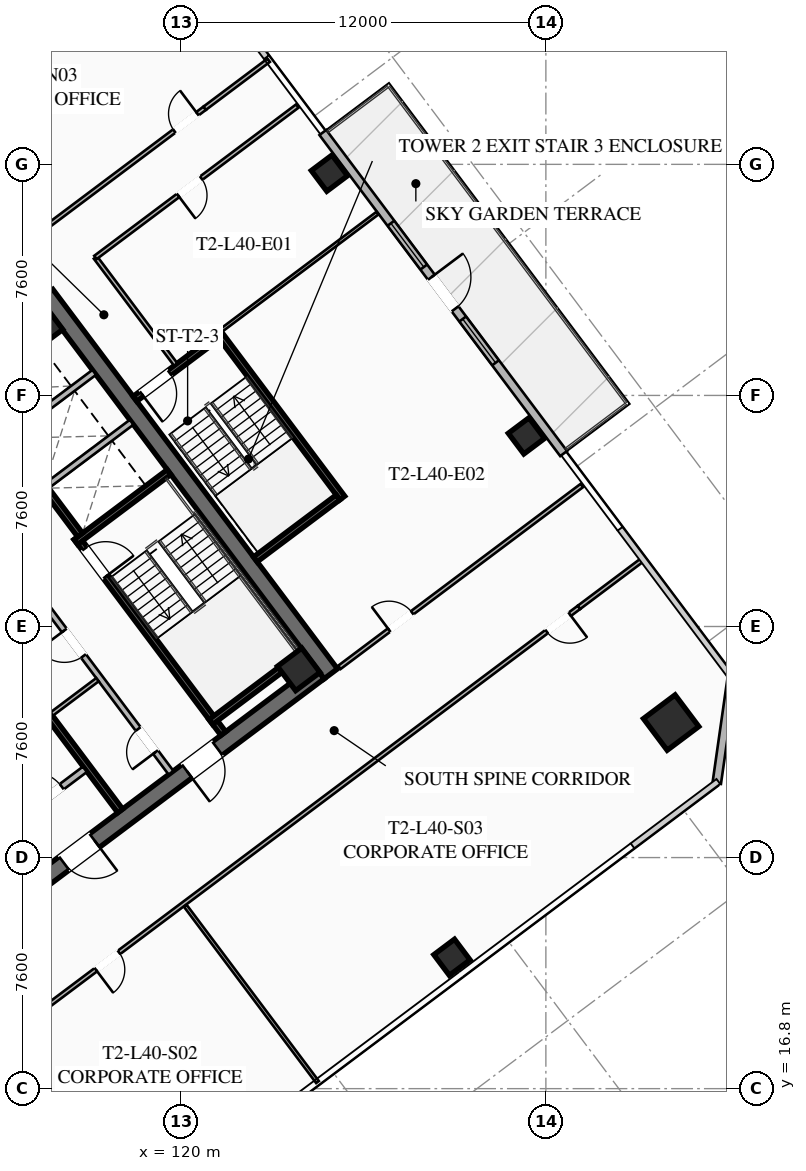
"""IFC4 building model, lengths in metres.
Left out: names, types, materials, properties, quantities, classifications, styles, units other than length and angle.
Written with IfcOpenShell. Run it as: python <this file> out.ifc"""

import sys

from ifc_helpers import new_model, si_unit, direction, frame, frame_2d, origin, origin_2d, place, context, subcontext, project, spatial, rectangle, hollow_rectangle, extrude, element, fill, save


model = new_model("IFC4")
c1 = context("Model", 3, precision=1e-05, world=origin(), true_north=direction((0.0, 1.0)))
c2 = subcontext(c1, "Body", "Model", "MODEL_VIEW")
j1 = project(units=[si_unit("LENGTHUNIT", "METRE"), si_unit("PLANEANGLEUNIT", "RADIAN")], contexts=[c1])
p1 = place(None, origin())
s1 = spatial("IfcSite", under=j1, at=p1, CompositionType="ELEMENT")
p2 = place(p1, origin())
s2 = spatial("IfcBuilding", under=s1, at=p2, CompositionType="ELEMENT")
p3 = place(p2, frame((0.0, 0.0, 149.9)))
s3 = spatial("IfcBuildingStorey", under=s2, at=p3, CompositionType="ELEMENT", Elevation=149.9)
p4 = place(p3, frame((115.564, 42.923, 0.0), z_axis=(0.0, 0.0, 1.0), x_axis=(0.600005007985, -0.799996243986, 0.0)))
e1 = element("IfcWall", 1, at=p4, inside=s3, PredefinedType="SHEAR", context=c2, shape_type="SweptSolid", body=[
    extrude(rectangle(XDim=15.6, YDim=0.55, at=frame_2d((7.8, 0.0))), origin(), (0.0, 0.0, 1.0), 3.55),
])
p5 = place(p3, frame((124.539, 30.498, 0.0), z_axis=(0.0, 0.0, 1.0), x_axis=(-0.799998054672, -0.600002593761, 0.0)))
e2 = element("IfcWall", 2, at=p5, inside=s3, PredefinedType="SHEAR", context=c2, shape_type="SweptSolid", body=[
    extrude(rectangle(XDim=15.06, YDim=0.55, at=frame_2d((7.53, 0.0))), origin(), (0.0, 0.0, 1.0), 3.55),
])
p6 = place(p5, frame((9.23, 0.0, 0.0)))
e3 = element("IfcOpeningElement", 3, at=p6, cuts=e2, PredefinedType="OPENING", context=c2, shape_type="SweptSolid", body=[
    extrude(rectangle(XDim=1.25, YDim=2.25, at=frame_2d((0.625, 1.125))), frame((0.0, 0.285, 0.0), z_axis=(0.0, -1.0, 0.0), x_axis=(1.0, 0.0, 0.0)), (0.0, 0.0, 1.0), 0.57),
])
p7 = place(p5, frame((4.18, 0.0, 0.0)))
e4 = element("IfcOpeningElement", 4, at=p7, cuts=e2, PredefinedType="OPENING", context=c2, shape_type="SweptSolid", body=[
    extrude(rectangle(XDim=1.25, YDim=2.25, at=frame_2d((0.625, 1.125))), frame((0.0, 0.285, 0.0), z_axis=(0.0, -1.0, 0.0), x_axis=(1.0, 0.0, 0.0)), (0.0, 0.0, 1.0), 0.57),
])
for number, where, z_axis, x_axis in (
    (5, (123.87, 30.59, 0.0), (0.0, 0.0, 1.0), (0.8, 0.6, 0.0)),
    (6, (115.41, 41.87, 0.0), (0.0, 0.0, 1.0), (0.8, 0.6, 0.0)),
):
    element("IfcColumn", number, at=place(p3, frame(where, z_axis=z_axis, x_axis=x_axis)), inside=s3, PredefinedType="COLUMN", context=c2, shape_type="SweptSolid", body=[
        extrude(hollow_rectangle(XDim=1.0, YDim=1.0, WallThickness=0.04, at=origin_2d()), origin(), (0.0, 0.0, 1.0), 3.37),
    ])
p8 = place(p3, frame((136.12, 28.84, 0.0), z_axis=(0.0, 0.0, 1.0), x_axis=(0.799999996291, 0.600000004945, 0.0)))
e7 = element("IfcColumn", 7, at=p8, inside=s3, PredefinedType="COLUMN", context=c2, shape_type="SweptSolid", body=[
    extrude(hollow_rectangle(XDim=1.3, YDim=1.3, WallThickness=0.05, at=origin_2d()), origin(), (0.0, 0.0, 1.0), 3.37),
])
for number, where, z_axis, x_axis in (
    (8, (128.91, 21.12, 0.0), (0.0, 0.0, 1.0), (0.8, 0.6, 0.0)),
    (9, (131.36, 38.27, 0.0), (0.0, 0.0, 1.0), (0.8, 0.6, 0.0)),
    (10, (124.88, 46.91, 0.0), (0.0, 0.0, 1.0), (0.8, 0.6, 0.0)),
):
    element("IfcColumn", number, at=place(p3, frame(where, z_axis=z_axis, x_axis=x_axis)), inside=s3, PredefinedType="COLUMN", context=c2, shape_type="SweptSolid", body=[
        extrude(hollow_rectangle(XDim=0.85, YDim=0.85, WallThickness=0.035, at=origin_2d()), origin(), (0.0, 0.0, 1.0), 3.37),
    ])
p9 = place(p3, frame((124.664, 48.248, 0.0), z_axis=(0.0, 0.0, 1.0), x_axis=(0.599994081423, -0.800004438899, 0.0)))
e11 = element("IfcWall", 11, at=p9, inside=s3, PredefinedType="SOLIDWALL", context=c2, shape_type="SweptSolid", body=[
    extrude(rectangle(XDim=13.2, YDim=0.28, at=frame_2d((6.6, 0.0))), origin(), (0.0, 0.0, 1.0), 3.37),
])
p10 = place(p9, frame((5.95, 0.0, 0.0)))
e12 = element("IfcOpeningElement", 12, at=p10, cuts=e11, PredefinedType="OPENING", context=c2, shape_type="SweptSolid", body=[
    extrude(rectangle(XDim=1.3, YDim=2.15, at=frame_2d((0.65, 1.075))), frame((0.0, 0.15, 0.0), z_axis=(0.0, -1.0, 0.0), x_axis=(1.0, 0.0, 0.0)), (0.0, 0.0, 1.0), 0.3),
])
p11 = place(p9, frame((3.732, 0.0, 0.85)))
e13 = element("IfcOpeningElement", 13, at=p11, cuts=e11, PredefinedType="OPENING", context=c2, shape_type="SweptSolid", body=[
    extrude(rectangle(XDim=1.8, YDim=1.92, at=frame_2d((0.9, 0.96))), frame((0.0, 0.15, 0.0), z_axis=(0.0, -1.0, 0.0), x_axis=(1.0, 0.0, 0.0)), (0.0, 0.0, 1.0), 0.3),
])
p12 = place(p9, frame((7.668, 0.0, 0.85)))
e14 = element("IfcOpeningElement", 14, at=p12, cuts=e11, PredefinedType="OPENING", context=c2, shape_type="SweptSolid", body=[
    extrude(rectangle(XDim=1.8, YDim=1.92, at=frame_2d((0.9, 0.96))), frame((0.0, 0.15, 0.0), z_axis=(0.0, -1.0, 0.0), x_axis=(1.0, 0.0, 0.0)), (0.0, 0.0, 1.0), 0.3),
])
p13 = place(p3, frame((138.12, 30.34, 0.0), z_axis=(0.0, 0.0, 1.0), x_axis=(-0.141421356237, -0.989949493661, 0.0)))
e15 = element("IfcWall", 15, at=p13, inside=s3, PredefinedType="SOLIDWALL", context=c2, shape_type="SweptSolid", body=[
    extrude(rectangle(XDim=3.536, YDim=0.28, at=frame_2d((1.768, 0.0))), origin(), (0.0, 0.0, 1.0), 3.37),
])
p14 = place(p3, frame((116.56, 34.92, 0.0), z_axis=(0.0, 0.0, 1.0), x_axis=(0.59999029481, -0.8000072788, 0.0)))
e16 = element("IfcWall", 16, at=p14, inside=s3, PredefinedType="SHEAR", context=c2, shape_type="SweptSolid", body=[
    extrude(rectangle(XDim=8.05, YDim=0.2, at=frame_2d((4.025, 0.0))), origin(), (0.0, 0.0, 1.0), 3.37),
])
p15 = place(p14, frame((0.45, 0.0, 0.0)))
e17 = element("IfcOpeningElement", 17, at=p15, cuts=e16, PredefinedType="OPENING", context=c2, shape_type="SweptSolid", body=[
    extrude(rectangle(XDim=1.15, YDim=2.2, at=frame_2d((0.575, 1.1))), frame((0.0, 0.11, 0.0), z_axis=(0.0, -1.0, 0.0), x_axis=(1.0, 0.0, 0.0)), (0.0, 0.0, 1.0), 0.22),
])
for number, where, z_axis, x_axis in (
    (18, (116.54, 34.78, 0.0), (0.0, 0.0, 1.0), (0.8, 0.6, 0.0)),
    (19, (120.98, 28.86, 0.0), (0.0, 0.0, 1.0), (0.8, 0.6, 0.0)),
):
    element("IfcWall", number, at=place(p3, frame(where, z_axis=z_axis, x_axis=x_axis)), inside=s3, PredefinedType="SHEAR", context=c2, shape_type="SweptSolid", body=[
        extrude(rectangle(XDim=3.83, YDim=0.2, at=frame_2d((1.915, 0.0))), origin(), (0.0, 0.0, 1.0), 3.37),
    ])
p16 = place(p3, frame((117.998, 25.936, 0.0), z_axis=(0.0, 0.0, 1.0), x_axis=(-0.600002693989, 0.799997979501, 0.0)))
e20 = element("IfcWall", 20, at=p16, inside=s3, PredefinedType="SHEAR", context=c2, shape_type="SweptSolid", body=[
    extrude(rectangle(XDim=14.5, YDim=0.2, at=frame_2d((7.25, 0.0))), origin(), (0.0, 0.0, 1.0), 3.37),
])
p17 = place(p3, frame((114.316, 25.412, 0.0), z_axis=(0.0, 0.0, 1.0), x_axis=(0.800018601094, 0.59997519774, 0.0)))
e21 = element("IfcWall", 21, at=p17, inside=s3, PredefinedType="SOLIDWALL", context=c2, shape_type="SweptSolid", body=[
    extrude(rectangle(XDim=3.15, YDim=0.22, at=frame_2d((1.575, 0.0))), origin(), (0.0, 0.0, 1.0), 2.723),
])
p18 = place(p17, frame((0.95, 0.0, 0.0)))
e22 = element("IfcOpeningElement", 22, at=p18, cuts=e21, PredefinedType="OPENING", context=c2, shape_type="SweptSolid", body=[
    extrude(rectangle(XDim=1.25, YDim=2.25, at=frame_2d((0.625, 1.125))), frame((0.0, 0.12, 0.0), z_axis=(0.0, -1.0, 0.0), x_axis=(1.0, 0.0, 0.0)), (0.0, 0.0, 1.0), 0.24),
])
p19 = place(p3, frame((112.81, 40.17, 0.0), z_axis=(0.0, 0.0, 1.0), x_axis=(0.599993943644, -0.800004542231, 0.0)))
e23 = element("IfcWall", 23, at=p19, inside=s3, PredefinedType="SHEAR", context=c2, shape_type="SweptSolid", body=[
    extrude(rectangle(XDim=6.45, YDim=0.2, at=frame_2d((3.225, 0.0))), origin(), (0.0, 0.0, 1.0), 3.37),
])
for number, where, z_axis, x_axis in (
    (24, (115.59, 36.63, 0.0), (0.0, 0.0, 1.0), (0.8, 0.6, 0.0)),
    (25, (114.36, 38.27, 0.0), (0.0, 0.0, 1.0), (0.8, 0.6, 0.0)),
):
    element("IfcWall", number, at=place(p3, frame(where, z_axis=z_axis, x_axis=x_axis)), inside=s3, PredefinedType="SOLIDWALL", context=c2, shape_type="SweptSolid", body=[
        extrude(rectangle(XDim=3.48, YDim=0.2, at=frame_2d((1.74, 0.0))), origin(), (0.0, 0.0, 1.0), 3.37),
    ])
p20 = place(p3, frame((119.67, 27.19, 0.0), z_axis=(0.0, 0.0, 1.0), x_axis=(-0.599988677396, 0.800008491828, 0.0)))
e26 = element("IfcWall", 26, at=p20, inside=s3, PredefinedType="SOLIDWALL", context=c2, shape_type="SweptSolid", body=[
    extrude(rectangle(XDim=6.9, YDim=0.2, at=frame_2d((3.45, 0.0))), origin(), (0.0, 0.0, 1.0), 2.723),
])
p21 = place(p20, frame((0.85, 0.0, 0.0)))
e27 = element("IfcOpeningElement", 27, at=p21, cuts=e26, PredefinedType="OPENING", context=c2, shape_type="SweptSolid", body=[
    extrude(rectangle(XDim=0.95, YDim=2.05, at=frame_2d((0.475, 1.025))), frame((0.0, 0.11, 0.0), z_axis=(0.0, -1.0, 0.0), x_axis=(1.0, 0.0, 0.0)), (0.0, 0.0, 1.0), 0.22),
])
p22 = place(p20, frame((4.8, 0.0, 0.0)))
e28 = element("IfcOpeningElement", 28, at=p22, cuts=e26, PredefinedType="OPENING", context=c2, shape_type="SweptSolid", body=[
    extrude(rectangle(XDim=1.05, YDim=2.2, at=frame_2d((0.525, 1.1))), frame((0.0, 0.11, 0.0), z_axis=(0.0, -1.0, 0.0), x_axis=(1.0, 0.0, 0.0)), (0.0, 0.0, 1.0), 0.22),
])
p23 = place(p3, frame((115.746, 29.122, 0.0), z_axis=(0.0, 0.0, 1.0), x_axis=(0.8, 0.6, 0.0)))
e29 = element("IfcWall", 29, at=p23, inside=s3, PredefinedType="PARTITIONING", context=c2, shape_type="SweptSolid", body=[
    extrude(rectangle(XDim=1.88, YDim=0.135, at=frame_2d((0.94, 0.0))), origin(), (0.0, 0.0, 1.0), 2.723),
])
p24 = place(p3, frame((125.304, 36.228, 0.0), z_axis=(0.0, 0.0, 1.0), x_axis=(-0.59998851072, 0.800008616831, 0.0)))
e30 = element("IfcWall", 30, at=p24, inside=s3, PredefinedType="SHEAR", context=c2, shape_type="SweptSolid", body=[
    extrude(rectangle(XDim=6.8, YDim=0.2, at=frame_2d((3.4, 0.0))), origin(), (0.0, 0.0, 1.0), 3.37),
])
p25 = place(p3, frame((121.204, 41.528, 0.0), z_axis=(0.0, 0.0, 1.0), x_axis=(-0.800017232136, -0.599977023131, 0.0)))
e31 = element("IfcWall", 31, at=p25, inside=s3, PredefinedType="SHEAR", context=c2, shape_type="SweptSolid", body=[
    extrude(rectangle(XDim=3.4, YDim=0.2, at=frame_2d((1.7, 0.0))), origin(), (0.0, 0.0, 1.0), 3.37),
])
p26 = place(p25, frame((1.975, 0.0, 0.0)))
e32 = element("IfcOpeningElement", 32, at=p26, cuts=e31, PredefinedType="OPENING", context=c2, shape_type="SweptSolid", body=[
    extrude(rectangle(XDim=1.15, YDim=2.2, at=frame_2d((0.575, 1.1))), frame((0.0, 0.11, 0.0), z_axis=(0.0, -1.0, 0.0), x_axis=(1.0, 0.0, 0.0)), (0.0, 0.0, 1.0), 0.22),
])
p27 = place(p3, frame((122.444, 34.208, 0.0), z_axis=(0.0, 0.0, 1.0), x_axis=(0.79999138319, 0.600011488909, 0.0)))
e33 = element("IfcWall", 33, at=p27, inside=s3, PredefinedType="SHEAR", context=c2, shape_type="SweptSolid", body=[
    extrude(rectangle(XDim=3.4, YDim=0.2, at=frame_2d((1.7, 0.0))), origin(), (0.0, 0.0, 1.0), 3.37),
])
p28 = place(p3, frame((119.824, 40.618, 0.0), z_axis=(0.0, 0.0, 1.0), x_axis=(-0.599982243973, 0.800013316712, 0.0)))
e34 = element("IfcWall", 34, at=p28, inside=s3, PredefinedType="PARTITIONING", context=c2, shape_type="SweptSolid", body=[
    extrude(rectangle(XDim=4.4, YDim=0.135, at=frame_2d((2.2, 0.0))), origin(), (0.0, 0.0, 1.0), 2.723),
])
p29 = place(p3, frame((95.738, 30.266, 0.0), z_axis=(0.0, 0.0, 1.0), x_axis=(0.800003744006, 0.59999500796, 0.0)))
e35 = element("IfcWall", 35, at=p29, inside=s3, PredefinedType="PARTITIONING", context=c2, shape_type="SweptSolid", body=[
    extrude(rectangle(XDim=31.3, YDim=0.135, at=frame_2d((15.65, 0.0))), origin(), (0.0, 0.0, 1.0), 2.723),
])
p30 = place(p29, frame((0.3, 0.0, 0.0)))
e36 = element("IfcOpeningElement", 36, at=p30, cuts=e35, PredefinedType="OPENING", context=c2, shape_type="SweptSolid", body=[
    extrude(rectangle(XDim=0.95, YDim=2.05, at=frame_2d((0.475, 1.025))), frame((0.0, 0.077, 0.0), z_axis=(0.0, -1.0, 0.0), x_axis=(1.0, 0.0, 0.0)), (0.0, 0.0, 1.0), 0.155),
])
p31 = place(p29, frame((15.493, 0.0, 0.0)))
e37 = element("IfcOpeningElement", 37, at=p31, cuts=e35, PredefinedType="OPENING", context=c2, shape_type="SweptSolid", body=[
    extrude(rectangle(XDim=0.95, YDim=2.05, at=frame_2d((0.475, 1.025))), frame((0.0, 0.077, 0.0), z_axis=(0.0, -1.0, 0.0), x_axis=(1.0, 0.0, 0.0)), (0.0, 0.0, 1.0), 0.155),
])
p32 = place(p29, frame((30.05, 0.0, 0.0)))
e38 = element("IfcOpeningElement", 38, at=p32, cuts=e35, PredefinedType="OPENING", context=c2, shape_type="SweptSolid", body=[
    extrude(rectangle(XDim=0.95, YDim=2.05, at=frame_2d((0.475, 1.025))), frame((0.0, 0.077, 0.0), z_axis=(0.0, -1.0, 0.0), x_axis=(1.0, 0.0, 0.0)), (0.0, 0.0, 1.0), 0.155),
])
p33 = place(p3, frame((120.778, 49.046, 0.0), z_axis=(0.0, 0.0, 1.0), x_axis=(0.799977721118, 0.600029704027, 0.0)))
e39 = element("IfcWall", 39, at=p33, inside=s3, PredefinedType="PARTITIONING", context=c2, shape_type="SweptSolid", body=[
    extrude(rectangle(XDim=2.63, YDim=0.135, at=frame_2d((1.315, 0.0))), origin(), (0.0, 0.0, 1.0), 2.723),
])
p34 = place(p3, frame((133.09, 32.63, 0.0), z_axis=(0.0, 0.0, 1.0), x_axis=(-0.800003744006, -0.59999500796, 0.0)))
e40 = element("IfcWall", 40, at=p34, inside=s3, PredefinedType="PARTITIONING", context=c2, shape_type="SweptSolid", body=[
    extrude(rectangle(XDim=31.3, YDim=0.135, at=frame_2d((15.65, 0.0))), origin(), (0.0, 0.0, 1.0), 2.723),
])
p35 = place(p34, frame((29.97, 0.0, 0.0)))
e41 = element("IfcOpeningElement", 41, at=p35, cuts=e40, PredefinedType="OPENING", context=c2, shape_type="SweptSolid", body=[
    extrude(rectangle(XDim=0.95, YDim=2.05, at=frame_2d((0.475, 1.025))), frame((0.0, 0.077, 0.0), z_axis=(0.0, -1.0, 0.0), x_axis=(1.0, 0.0, 0.0)), (0.0, 0.0, 1.0), 0.155),
])
p36 = place(p34, frame((18.914, 0.0, 0.0)))
e42 = element("IfcOpeningElement", 42, at=p36, cuts=e40, PredefinedType="OPENING", context=c2, shape_type="SweptSolid", body=[
    extrude(rectangle(XDim=0.95, YDim=2.05, at=frame_2d((0.475, 1.025))), frame((0.0, 0.077, 0.0), z_axis=(0.0, -1.0, 0.0), x_axis=(1.0, 0.0, 0.0)), (0.0, 0.0, 1.0), 0.155),
])
p37 = place(p34, frame((0.38, 0.0, 0.0)))
e43 = element("IfcOpeningElement", 43, at=p37, cuts=e40, PredefinedType="OPENING", context=c2, shape_type="SweptSolid", body=[
    extrude(rectangle(XDim=0.95, YDim=2.05, at=frame_2d((0.475, 1.025))), frame((0.0, 0.077, 0.0), z_axis=(0.0, -1.0, 0.0), x_axis=(1.0, 0.0, 0.0)), (0.0, 0.0, 1.0), 0.155),
])
p38 = place(p3, frame((133.09, 32.63, 0.0), z_axis=(0.0, 0.0, 1.0), x_axis=(0.799977721118, 0.600029704027, 0.0)))
e44 = element("IfcWall", 44, at=p38, inside=s3, PredefinedType="PARTITIONING", context=c2, shape_type="SweptSolid", body=[
    extrude(rectangle(XDim=2.63, YDim=0.135, at=frame_2d((1.315, 0.0))), origin(), (0.0, 0.0, 1.0), 2.723),
])
for number, where, z_axis, x_axis in (
    (45, (118.248, 12.336, 0.0), (0.0, 0.0, 1.0), (-0.6, 0.8, 0.0)),
    (46, (124.488, 17.016, 0.0), (0.0, 0.0, 1.0), (-0.6, 0.8, 0.0)),
):
    element("IfcWall", number, at=place(p3, frame(where, z_axis=z_axis, x_axis=x_axis)), inside=s3, PredefinedType="PARTITIONING", context=c2, shape_type="SweptSolid", body=[
        extrude(rectangle(XDim=7.25, YDim=0.11, at=frame_2d((3.625, 0.0))), origin(), (0.0, 0.0, 1.0), 2.723),
    ])
p39 = place(p3, frame((123.824, 49.118, 0.0), z_axis=(0.0, 0.0, 1.0), x_axis=(-0.799996470201, -0.60000470637, 0.0)))
e47 = element("IfcWall", 47, at=p39, inside=s3, PredefinedType="PARTITIONING", context=c2, shape_type="SweptSolid", body=[
    extrude(rectangle(XDim=8.3, YDim=0.135, at=frame_2d((4.15, 0.0))), origin(), (0.0, 0.0, 1.0), 2.723),
])
p40 = place(p39, frame((3.95, 0.0, 0.0)))
e48 = element("IfcOpeningElement", 48, at=p40, cuts=e47, PredefinedType="OPENING", context=c2, shape_type="SweptSolid", body=[
    extrude(rectangle(XDim=0.95, YDim=2.05, at=frame_2d((0.475, 1.025))), frame((0.0, 0.077, 0.0), z_axis=(0.0, -1.0, 0.0), x_axis=(1.0, 0.0, 0.0)), (0.0, 0.0, 1.0), 0.155),
])
p41 = place(p3, frame((125.208, 30.656, 0.0), z_axis=(0.0, 0.0, 1.0), x_axis=(0.800005876956, 0.599992163979, 0.0)))
e49 = element("IfcWall", 49, at=p41, inside=s3, PredefinedType="PARTITIONING", context=c2, shape_type="SweptSolid", body=[
    extrude(rectangle(XDim=9.97, YDim=0.135, at=frame_2d((4.985, 0.0))), origin(), (0.0, 0.0, 1.0), 2.723),
])
p42 = place(p41, frame((2.045, 0.0, 0.0)))
e50 = element("IfcOpeningElement", 50, at=p42, cuts=e49, PredefinedType="OPENING", context=c2, shape_type="SweptSolid", body=[
    extrude(rectangle(XDim=0.95, YDim=2.05, at=frame_2d((0.475, 1.025))), frame((0.0, 0.077, 0.0), z_axis=(0.0, -1.0, 0.0), x_axis=(1.0, 0.0, 0.0)), (0.0, 0.0, 1.0), 0.155),
])
p43 = place(p3, frame((126.464, 45.598, 0.0), z_axis=(0.0, 0.0, 1.0), x_axis=(-0.8000181681, -0.599975775102, 0.0)))
e51 = element("IfcWall", 51, at=p43, inside=s3, PredefinedType="PARTITIONING", context=c2, shape_type="SweptSolid", body=[
    extrude(rectangle(XDim=6.45, YDim=0.11, at=frame_2d((3.225, 0.0))), origin(), (0.0, 0.0, 1.0), 2.723),
])
p44 = place(p10, origin())
e52 = element("IfcDoor", 52, at=p44, inside=s3, OperationType="SINGLE_SWING_LEFT", PredefinedType="DOOR", context=c2, shape_type="SweptSolid", body=[
    extrude(rectangle(XDim=1.3, YDim=2.15, at=frame_2d((0.65, 1.075))), frame((0.0, 0.025, 0.0), z_axis=(0.0, -1.0, 0.0), x_axis=(1.0, 0.0, 0.0)), (0.0, 0.0, 1.0), 0.05),
])
fill(e12, e52)
p45 = place(p11, origin())
e53 = element("IfcWindow", 53, at=p45, inside=s3, PartitioningType="SINGLE_PANEL", PredefinedType="WINDOW", context=c2, shape_type="SweptSolid", body=[
    extrude(rectangle(XDim=1.8, YDim=1.92, at=frame_2d((0.9, 0.96))), frame((0.0, 0.03, 0.0), z_axis=(0.0, -1.0, 0.0), x_axis=(1.0, 0.0, 0.0)), (0.0, 0.0, 1.0), 0.06),
])
fill(e13, e53)
p46 = place(p12, origin())
e54 = element("IfcWindow", 54, at=p46, inside=s3, PartitioningType="SINGLE_PANEL", PredefinedType="WINDOW", context=c2, shape_type="SweptSolid", body=[
    extrude(rectangle(XDim=1.8, YDim=1.92, at=frame_2d((0.9, 0.96))), frame((0.0, 0.03, 0.0), z_axis=(0.0, -1.0, 0.0), x_axis=(1.0, 0.0, 0.0)), (0.0, 0.0, 1.0), 0.06),
])
fill(e14, e54)
p47 = place(p6, origin())
e55 = element("IfcDoor", 55, at=p47, inside=s3, OperationType="SINGLE_SWING_LEFT", PredefinedType="DOOR", context=c2, shape_type="SweptSolid", body=[
    extrude(rectangle(XDim=1.25, YDim=2.25, at=frame_2d((0.625, 1.125))), frame((0.0, 0.025, 0.0), z_axis=(0.0, -1.0, 0.0), x_axis=(1.0, 0.0, 0.0)), (0.0, 0.0, 1.0), 0.05),
])
fill(e3, e55)
p48 = place(p7, origin())
e56 = element("IfcDoor", 56, at=p48, inside=s3, OperationType="SINGLE_SWING_RIGHT", PredefinedType="DOOR", context=c2, shape_type="SweptSolid", body=[
    extrude(rectangle(XDim=1.25, YDim=2.25, at=frame_2d((0.625, 1.125))), frame((0.0, 0.025, 0.0), z_axis=(0.0, -1.0, 0.0), x_axis=(1.0, 0.0, 0.0)), (0.0, 0.0, 1.0), 0.05),
])
fill(e4, e56)
p49 = place(p15, origin())
e57 = element("IfcDoor", 57, at=p49, inside=s3, OperationType="SINGLE_SWING_RIGHT", PredefinedType="DOOR", context=c2, shape_type="SweptSolid", body=[
    extrude(rectangle(XDim=1.15, YDim=2.2, at=frame_2d((0.575, 1.1))), frame((0.0, 0.025, 0.0), z_axis=(0.0, -1.0, 0.0), x_axis=(1.0, 0.0, 0.0)), (0.0, 0.0, 1.0), 0.05),
])
fill(e17, e57)
p50 = place(p18, origin())
e58 = element("IfcDoor", 58, at=p50, inside=s3, OperationType="SINGLE_SWING_LEFT", PredefinedType="DOOR", context=c2, shape_type="SweptSolid", body=[
    extrude(rectangle(XDim=1.25, YDim=2.25, at=frame_2d((0.625, 1.125))), frame((0.0, 0.025, 0.0), z_axis=(0.0, -1.0, 0.0), x_axis=(1.0, 0.0, 0.0)), (0.0, 0.0, 1.0), 0.05),
])
fill(e22, e58)
p51 = place(p21, origin())
e59 = element("IfcDoor", 59, at=p51, inside=s3, OperationType="SINGLE_SWING_LEFT", PredefinedType="DOOR", context=c2, shape_type="SweptSolid", body=[
    extrude(rectangle(XDim=0.95, YDim=2.05, at=frame_2d((0.475, 1.025))), frame((0.0, 0.025, 0.0), z_axis=(0.0, -1.0, 0.0), x_axis=(1.0, 0.0, 0.0)), (0.0, 0.0, 1.0), 0.05),
])
fill(e27, e59)
p52 = place(p22, origin())
e60 = element("IfcDoor", 60, at=p52, inside=s3, OperationType="SINGLE_SWING_RIGHT", PredefinedType="DOOR", context=c2, shape_type="SweptSolid", body=[
    extrude(rectangle(XDim=1.05, YDim=2.2, at=frame_2d((0.525, 1.1))), frame((0.0, 0.025, 0.0), z_axis=(0.0, -1.0, 0.0), x_axis=(1.0, 0.0, 0.0)), (0.0, 0.0, 1.0), 0.05),
])
fill(e28, e60)
p53 = place(p26, origin())
e61 = element("IfcDoor", 61, at=p53, inside=s3, OperationType="SINGLE_SWING_RIGHT", PredefinedType="DOOR", context=c2, shape_type="SweptSolid", body=[
    extrude(rectangle(XDim=1.15, YDim=2.2, at=frame_2d((0.575, 1.1))), frame((0.0, 0.025, 0.0), z_axis=(0.0, -1.0, 0.0), x_axis=(1.0, 0.0, 0.0)), (0.0, 0.0, 1.0), 0.05),
])
fill(e32, e61)
p54 = place(p32, origin())
e62 = element("IfcDoor", 62, at=p54, inside=s3, OperationType="SINGLE_SWING_RIGHT", PredefinedType="DOOR", context=c2, shape_type="SweptSolid", body=[
    extrude(rectangle(XDim=0.95, YDim=2.05, at=frame_2d((0.475, 1.025))), frame((0.0, 0.025, 0.0), z_axis=(0.0, -1.0, 0.0), x_axis=(1.0, 0.0, 0.0)), (0.0, 0.0, 1.0), 0.05),
])
fill(e38, e62)
p55 = place(p36, origin())
e63 = element("IfcDoor", 63, at=p55, inside=s3, OperationType="SINGLE_SWING_RIGHT", PredefinedType="DOOR", context=c2, shape_type="SweptSolid", body=[
    extrude(rectangle(XDim=0.95, YDim=2.05, at=frame_2d((0.475, 1.025))), frame((0.0, 0.025, 0.0), z_axis=(0.0, -1.0, 0.0), x_axis=(1.0, 0.0, 0.0)), (0.0, 0.0, 1.0), 0.05),
])
fill(e42, e63)
p56 = place(p37, origin())
e64 = element("IfcDoor", 64, at=p56, inside=s3, OperationType="SINGLE_SWING_LEFT", PredefinedType="DOOR", context=c2, shape_type="SweptSolid", body=[
    extrude(rectangle(XDim=0.95, YDim=2.05, at=frame_2d((0.475, 1.025))), frame((0.0, 0.025, 0.0), z_axis=(0.0, -1.0, 0.0), x_axis=(1.0, 0.0, 0.0)), (0.0, 0.0, 1.0), 0.05),
])
fill(e43, e64)
p57 = place(p40, origin())
e65 = element("IfcDoor", 65, at=p57, inside=s3, OperationType="SINGLE_SWING_RIGHT", PredefinedType="DOOR", context=c2, shape_type="SweptSolid", body=[
    extrude(rectangle(XDim=0.95, YDim=2.05, at=frame_2d((0.475, 1.025))), frame((0.0, 0.025, 0.0), z_axis=(0.0, -1.0, 0.0), x_axis=(1.0, 0.0, 0.0)), (0.0, 0.0, 1.0), 0.05),
])
fill(e48, e65)
p58 = place(p42, origin())
e66 = element("IfcDoor", 66, at=p58, inside=s3, OperationType="SINGLE_SWING_LEFT", PredefinedType="DOOR", context=c2, shape_type="SweptSolid", body=[
    extrude(rectangle(XDim=0.95, YDim=2.05, at=frame_2d((0.475, 1.025))), frame((0.0, 0.025, 0.0), z_axis=(0.0, -1.0, 0.0), x_axis=(1.0, 0.0, 0.0)), (0.0, 0.0, 1.0), 0.05),
])
fill(e50, e66)
save(model, sys.argv[1])
